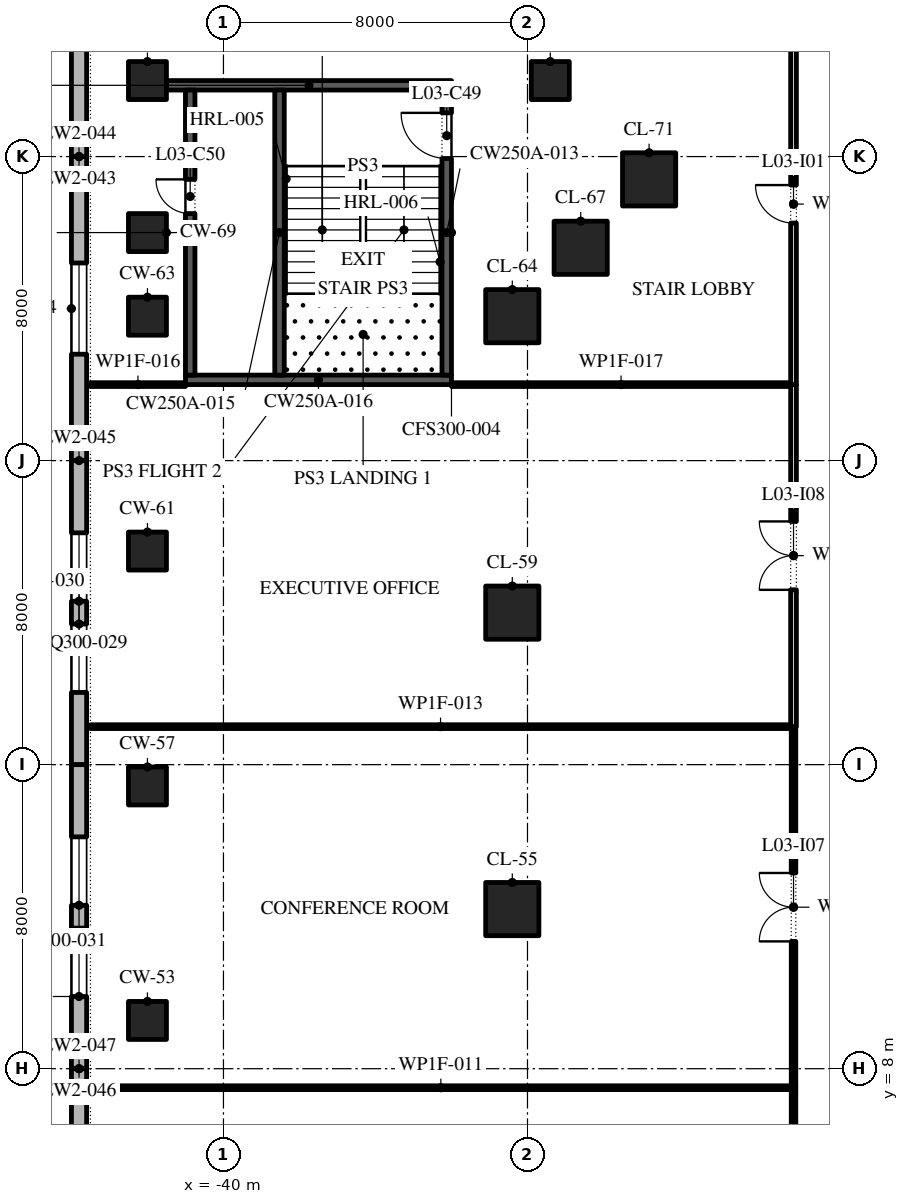
"""IFC4 building model, lengths in metres.
Left out: names, types, materials, properties, quantities, classifications, styles, units other than length and angle.
Written with IfcOpenShell. Run it as: python <this file> out.ifc"""

import sys

from ifc_helpers import new_model, si_unit, direction, frame, frame_2d, origin, origin_2d, place, context, subcontext, project, spatial, polyline, rectangle, outline, extrude, element, fill, save


model = new_model("IFC4")
c1 = context("Model", 3, precision=1e-05, world=origin(), true_north=direction((0.0, 1.0)))
c2 = subcontext(c1, "Body", "Model", "MODEL_VIEW")
j1 = project(units=[si_unit("LENGTHUNIT", "METRE"), si_unit("PLANEANGLEUNIT", "RADIAN")], contexts=[c1])
p1 = place(None, origin())
s1 = spatial("IfcSite", under=j1, at=p1, CompositionType="ELEMENT")
p2 = place(p1, origin())
s2 = spatial("IfcBuilding", under=s1, at=p2, CompositionType="ELEMENT")
p3 = place(p2, frame((0.0, 0.0, 19.2)))
s3 = spatial("IfcBuildingStorey", under=s2, at=p3, CompositionType="ELEMENT", Elevation=19.2)
p4 = place(p3, frame((-42.0, 9.27, 0.0), z_axis=(0.0, 0.0, 1.0), x_axis=(1.0, 0.0, 0.0)))
e1 = element("IfcColumn", 1, at=p4, inside=s3, PredefinedType="COLUMN", context=c2, shape_type="SweptSolid", body=[
    extrude(rectangle(XDim=1.0, YDim=1.0, at=origin_2d()), origin(), (0.0, 0.0, 1.0), 4.8),
])
p5 = place(p3, frame((-32.4, 12.2, 0.0), z_axis=(0.0, 0.0, 1.0), x_axis=(1.0, 0.0, 0.0)))
e2 = element("IfcColumn", 2, at=p5, inside=s3, PredefinedType="COLUMN", context=c2, shape_type="SweptSolid", body=[
    extrude(rectangle(XDim=1.4, YDim=1.4, at=origin_2d()), origin(), (0.0, 0.0, 1.0), 4.8),
])
p6 = place(p3, frame((-42.0, 15.44, 0.0), z_axis=(0.0, 0.0, 1.0), x_axis=(1.0, 0.0, 0.0)))
e3 = element("IfcColumn", 3, at=p6, inside=s3, PredefinedType="COLUMN", context=c2, shape_type="SweptSolid", body=[
    extrude(rectangle(XDim=1.0, YDim=1.0, at=origin_2d()), origin(), (0.0, 0.0, 1.0), 4.8),
])
p7 = place(p3, frame((-32.4, 20.0, 0.0), z_axis=(0.0, 0.0, 1.0), x_axis=(1.0, 0.0, 0.0)))
e4 = element("IfcColumn", 4, at=p7, inside=s3, PredefinedType="COLUMN", context=c2, shape_type="SweptSolid", body=[
    extrude(rectangle(XDim=1.4, YDim=1.4, at=origin_2d()), origin(), (0.0, 0.0, 1.0), 4.8),
])
for number, where, z_axis, x_axis in (
    (5, (-42.0, 21.62, 0.0), (0.0, 0.0, 1.0), (1.0, 0.0, 0.0)),
    (6, (-42.0, 27.8, 0.0), (0.0, 0.0, 1.0), (1.0, 0.0, 0.0)),
):
    element("IfcColumn", number, at=place(p3, frame(where, z_axis=z_axis, x_axis=x_axis)), inside=s3, PredefinedType="COLUMN", context=c2, shape_type="SweptSolid", body=[
        extrude(rectangle(XDim=1.0, YDim=1.0, at=origin_2d()), origin(), (0.0, 0.0, 1.0), 4.8),
    ])
for number, where, z_axis, x_axis in (
    (7, (-32.4, 27.8, 0.0), (0.0, 0.0, 1.0), (1.0, 0.0, 0.0)),
    (8, (-30.6, 29.6, 0.0), (0.0, 0.0, 1.0), (1.0, 0.0, 0.0)),
):
    element("IfcColumn", number, at=place(p3, frame(where, z_axis=z_axis, x_axis=x_axis)), inside=s3, PredefinedType="COLUMN", context=c2, shape_type="SweptSolid", body=[
        extrude(rectangle(XDim=1.4, YDim=1.4, at=origin_2d()), origin(), (0.0, 0.0, 1.0), 4.8),
    ])
p8 = place(p3, frame((-42.0, 30.0, 0.0), z_axis=(0.0, 0.0, 1.0), x_axis=(1.0, 0.0, 0.0)))
e9 = element("IfcColumn", 9, at=p8, inside=s3, PredefinedType="COLUMN", context=c2, shape_type="SweptSolid", body=[
    extrude(rectangle(XDim=1.0, YDim=1.0, at=origin_2d()), origin(), (0.0, 0.0, 1.0), 4.8),
])
p9 = place(p3, frame((-28.8, 31.4, 0.0), z_axis=(0.0, 0.0, 1.0), x_axis=(1.0, 0.0, 0.0)))
e10 = element("IfcColumn", 10, at=p9, inside=s3, PredefinedType="COLUMN", context=c2, shape_type="SweptSolid", body=[
    extrude(rectangle(XDim=1.4, YDim=1.4, at=origin_2d()), origin(), (0.0, 0.0, 1.0), 4.8),
])
for number, where, z_axis, x_axis in (
    (11, (-42.0, 34.0, 0.0), (0.0, 0.0, 1.0), (1.0, 0.0, 0.0)),
    (12, (-31.4, 34.0, 0.0), (0.0, 0.0, 1.0), (1.0, 0.0, 0.0)),
):
    element("IfcColumn", number, at=place(p3, frame(where, z_axis=z_axis, x_axis=x_axis)), inside=s3, PredefinedType="COLUMN", context=c2, shape_type="SweptSolid", body=[
        extrude(rectangle(XDim=1.0, YDim=1.0, at=origin_2d()), origin(), (0.0, 0.0, 1.0), 4.8),
    ])
p10 = place(p3, frame((-43.8, 35.6, 0.0), z_axis=(0.0, 0.0, 1.0), x_axis=(0.0, -1.0, 0.0)))
e13 = element("IfcWall", 13, at=p10, inside=s3, PredefinedType="STANDARD", context=c2, shape_type="SweptSolid", body=[
    extrude(rectangle(XDim=3.6, YDim=0.4, at=frame_2d((1.8, 0.0))), origin(), (0.0, 0.0, 1.0), 4.5),
])
p11 = place(p3, frame((-43.8, 32.0, 0.0), z_axis=(0.0, 0.0, 1.0), x_axis=(0.0, -1.0, 0.0)))
e14 = element("IfcWall", 14, at=p11, inside=s3, PredefinedType="STANDARD", context=c2, shape_type="SweptSolid", body=[
    extrude(rectangle(XDim=8.0, YDim=0.4, at=frame_2d((4.0, 0.0))), origin(), (0.0, 0.0, 1.0), 4.5),
])
p12 = place(p11, frame((2.8, 0.0, 0.9)))
e15 = element("IfcOpeningElement", 15, at=p12, cuts=e14, PredefinedType="OPENING", context=c2, shape_type="SweptSolid", body=[
    extrude(outline(polyline([(0.0, 0.0), (2.4, 0.0), (2.4, 1.5), (2.378, 1.758), (2.313, 2.009), (2.207, 2.245), (2.063, 2.46), (1.885, 2.648), (1.677, 2.804), (1.447, 2.922), (1.2, 3.0), (0.953, 2.922), (0.722, 2.804), (0.515, 2.648), (0.337, 2.46), (0.193, 2.245), (0.087, 2.009), (0.022, 1.758), (0.0, 1.5), (0.0, 0.0)])), frame((0.0, 0.21, 0.0), z_axis=(0.0, -1.0, 0.0), x_axis=(1.0, 0.0, 0.0)), (0.0, 0.0, 1.0), 0.42),
])
p13 = place(p3, frame((-43.8, 24.0, 0.0), z_axis=(0.0, 0.0, 1.0), x_axis=(0.0, -1.0, 0.0)))
e16 = element("IfcWall", 16, at=p13, inside=s3, PredefinedType="STANDARD", context=c2, shape_type="SweptSolid", body=[
    extrude(rectangle(XDim=8.0, YDim=0.4, at=frame_2d((4.0, 0.0))), origin(), (0.0, 0.0, 1.0), 4.5),
])
p14 = place(p13, frame((1.9, 0.0, 0.9)))
e17 = element("IfcOpeningElement", 17, at=p14, cuts=e16, PredefinedType="OPENING", context=c2, shape_type="SweptSolid", body=[
    extrude(outline(polyline([(0.0, 0.0), (1.8, 0.0), (1.8, 1.5), (1.785, 1.729), (1.738, 1.954), (1.662, 2.17), (1.558, 2.375), (1.427, 2.563), (1.271, 2.732), (1.095, 2.879), (0.9, 3.0), (0.705, 2.879), (0.529, 2.732), (0.373, 2.563), (0.242, 2.375), (0.138, 2.17), (0.062, 1.954), (0.015, 1.729), (0.0, 1.5), (0.0, 0.0)])), frame((0.0, 0.21, 0.0), z_axis=(0.0, -1.0, 0.0), x_axis=(1.0, 0.0, 0.0)), (0.0, 0.0, 1.0), 0.42),
])
p15 = place(p13, frame((4.3, 0.0, 0.9)))
e18 = element("IfcOpeningElement", 18, at=p15, cuts=e16, PredefinedType="OPENING", context=c2, shape_type="SweptSolid", body=[
    extrude(outline(polyline([(0.0, 0.0), (1.8, 0.0), (1.8, 1.5), (1.785, 1.729), (1.738, 1.954), (1.662, 2.17), (1.558, 2.375), (1.427, 2.563), (1.271, 2.732), (1.095, 2.879), (0.9, 3.0), (0.705, 2.879), (0.529, 2.732), (0.373, 2.563), (0.242, 2.375), (0.138, 2.17), (0.062, 1.954), (0.015, 1.729), (0.0, 1.5), (0.0, 0.0)])), frame((0.0, 0.21, 0.0), z_axis=(0.0, -1.0, 0.0), x_axis=(1.0, 0.0, 0.0)), (0.0, 0.0, 1.0), 0.42),
])
p16 = place(p3, frame((-43.8, 16.0, 0.0), z_axis=(0.0, 0.0, 1.0), x_axis=(0.0, -1.0, 0.0)))
e19 = element("IfcWall", 19, at=p16, inside=s3, PredefinedType="STANDARD", context=c2, shape_type="SweptSolid", body=[
    extrude(rectangle(XDim=8.0, YDim=0.4, at=frame_2d((4.0, 0.0))), origin(), (0.0, 0.0, 1.0), 4.5),
])
p17 = place(p16, frame((1.9, 0.0, 0.9)))
e20 = element("IfcOpeningElement", 20, at=p17, cuts=e19, PredefinedType="OPENING", context=c2, shape_type="SweptSolid", body=[
    extrude(outline(polyline([(0.0, 0.0), (1.8, 0.0), (1.8, 1.5), (1.785, 1.729), (1.738, 1.954), (1.662, 2.17), (1.558, 2.375), (1.427, 2.563), (1.271, 2.732), (1.095, 2.879), (0.9, 3.0), (0.705, 2.879), (0.529, 2.732), (0.373, 2.563), (0.242, 2.375), (0.138, 2.17), (0.062, 1.954), (0.015, 1.729), (0.0, 1.5), (0.0, 0.0)])), frame((0.0, 0.21, 0.0), z_axis=(0.0, -1.0, 0.0), x_axis=(1.0, 0.0, 0.0)), (0.0, 0.0, 1.0), 0.42),
])
p18 = place(p16, frame((4.3, 0.0, 0.9)))
e21 = element("IfcOpeningElement", 21, at=p18, cuts=e19, PredefinedType="OPENING", context=c2, shape_type="SweptSolid", body=[
    extrude(outline(polyline([(0.0, 0.0), (1.8, 0.0), (1.8, 1.5), (1.785, 1.729), (1.738, 1.954), (1.662, 2.17), (1.558, 2.375), (1.427, 2.563), (1.271, 2.732), (1.095, 2.879), (0.9, 3.0), (0.705, 2.879), (0.529, 2.732), (0.373, 2.563), (0.242, 2.375), (0.138, 2.17), (0.062, 1.954), (0.015, 1.729), (0.0, 1.5), (0.0, 0.0)])), frame((0.0, 0.21, 0.0), z_axis=(0.0, -1.0, 0.0), x_axis=(1.0, 0.0, 0.0)), (0.0, 0.0, 1.0), 0.42),
])
p19 = place(p3, frame((-43.8, 8.0, 0.0), z_axis=(0.0, 0.0, 1.0), x_axis=(0.0, -1.0, 0.0)))
e22 = element("IfcWall", 22, at=p19, inside=s3, PredefinedType="STANDARD", context=c2, shape_type="SweptSolid", body=[
    extrude(rectangle(XDim=8.0, YDim=0.4, at=frame_2d((4.0, 0.0))), origin(), (0.0, 0.0, 1.0), 4.5),
])
p20 = place(p19, frame((1.9, 0.0, 0.9)))
e23 = element("IfcOpeningElement", 23, at=p20, cuts=e22, PredefinedType="OPENING", context=c2, shape_type="SweptSolid", body=[
    extrude(outline(polyline([(0.0, 0.0), (1.8, 0.0), (1.8, 1.5), (1.785, 1.729), (1.738, 1.954), (1.662, 2.17), (1.558, 2.375), (1.427, 2.563), (1.271, 2.732), (1.095, 2.879), (0.9, 3.0), (0.705, 2.879), (0.529, 2.732), (0.373, 2.563), (0.242, 2.375), (0.138, 2.17), (0.062, 1.954), (0.015, 1.729), (0.0, 1.5), (0.0, 0.0)])), frame((0.0, 0.21, 0.0), z_axis=(0.0, -1.0, 0.0), x_axis=(1.0, 0.0, 0.0)), (0.0, 0.0, 1.0), 0.42),
])
p21 = place(p19, frame((4.3, 0.0, 0.9)))
e24 = element("IfcOpeningElement", 24, at=p21, cuts=e22, PredefinedType="OPENING", context=c2, shape_type="SweptSolid", body=[
    extrude(outline(polyline([(0.0, 0.0), (1.8, 0.0), (1.8, 1.5), (1.785, 1.729), (1.738, 1.954), (1.662, 2.17), (1.558, 2.375), (1.427, 2.563), (1.271, 2.732), (1.095, 2.879), (0.9, 3.0), (0.705, 2.879), (0.529, 2.732), (0.373, 2.563), (0.242, 2.375), (0.138, 2.17), (0.062, 1.954), (0.015, 1.729), (0.0, 1.5), (0.0, 0.0)])), frame((0.0, 0.21, 0.0), z_axis=(0.0, -1.0, 0.0), x_axis=(1.0, 0.0, 0.0)), (0.0, 0.0, 1.0), 0.42),
])
p22 = place(p3, frame((-41.0, 26.125, 0.0), z_axis=(0.0, 0.0, 1.0), x_axis=(1.0, 0.0, 0.0)))
e25 = element("IfcWall", 25, at=p22, inside=s3, PredefinedType="SHEAR", context=c2, shape_type="SweptSolid", body=[
    extrude(rectangle(XDim=7.0, YDim=0.25, at=frame_2d((3.5, 0.0))), origin(), (0.0, 0.0, 1.0), 4.5),
])
p23 = place(p3, frame((-41.5, 33.875, 0.0), z_axis=(0.0, 0.0, 1.0), x_axis=(1.0, 0.0, 0.0)))
e26 = element("IfcWall", 26, at=p23, inside=s3, PredefinedType="SHEAR", context=c2, shape_type="SweptSolid", body=[
    extrude(rectangle(XDim=7.5, YDim=0.25, at=frame_2d((3.75, 0.0))), origin(), (0.0, 0.0, 1.0), 4.5),
])
p24 = place(p3, frame((-40.875, 26.25, 0.0), z_axis=(0.0, 0.0, 1.0), x_axis=(0.0, 1.0, 0.0)))
e27 = element("IfcWall", 27, at=p24, inside=s3, PredefinedType="SHEAR", context=c2, shape_type="SweptSolid", body=[
    extrude(rectangle(XDim=7.5, YDim=0.25, at=frame_2d((3.75, 0.0))), origin(), (0.0, 0.0, 1.0), 4.5),
])
p25 = place(p24, frame((4.25, 0.0, 0.0)))
e28 = element("IfcOpeningElement", 28, at=p25, cuts=e27, PredefinedType="OPENING", context=c2, shape_type="SweptSolid", body=[
    extrude(rectangle(XDim=0.9, YDim=2.1, at=frame_2d((0.45, 1.05))), frame((0.0, 0.135, 0.0), z_axis=(0.0, -1.0, 0.0), x_axis=(1.0, 0.0, 0.0)), (0.0, 0.0, 1.0), 0.27),
])
p26 = place(p3, frame((-34.125, 26.25, 0.0), z_axis=(0.0, 0.0, 1.0), x_axis=(0.0, 1.0, 0.0)))
e29 = element("IfcWall", 29, at=p26, inside=s3, PredefinedType="SHEAR", context=c2, shape_type="SweptSolid", body=[
    extrude(rectangle(XDim=7.5, YDim=0.25, at=frame_2d((3.75, 0.0))), origin(), (0.0, 0.0, 1.0), 4.5),
])
p27 = place(p26, frame((5.7, 0.0, 0.0)))
e30 = element("IfcOpeningElement", 30, at=p27, cuts=e29, PredefinedType="OPENING", context=c2, shape_type="SweptSolid", body=[
    extrude(rectangle(XDim=1.2, YDim=2.1, at=frame_2d((0.6, 1.05))), frame((0.0, 0.135, 0.0), z_axis=(0.0, -1.0, 0.0), x_axis=(1.0, 0.0, 0.0)), (0.0, 0.0, 1.0), 0.27),
])
p28 = place(p3, frame((-38.525, 26.25, 0.0), z_axis=(0.0, 0.0, 1.0), x_axis=(0.0, 1.0, 0.0)))
e31 = element("IfcWall", 31, at=p28, inside=s3, PredefinedType="SHEAR", context=c2, shape_type="SweptSolid", body=[
    extrude(rectangle(XDim=7.5, YDim=0.25, at=frame_2d((3.75, 0.0))), origin(), (0.0, 0.0, 1.0), 4.5),
])
p29 = place(p3, frame((-43.5, 7.5, 0.0), z_axis=(0.0, 0.0, 1.0), x_axis=(1.0, 0.0, 0.0)))
e32 = element("IfcWall", 32, at=p29, inside=s3, PredefinedType="PARTITIONING", context=c2, shape_type="SweptSolid", body=[
    extrude(rectangle(XDim=18.44, YDim=0.1, at=frame_2d((9.22, 0.0))), origin(), (0.0, 0.0, 1.0), 4.5),
])
p30 = place(p3, frame((-43.5, 17.0, 0.0), z_axis=(0.0, 0.0, 1.0), x_axis=(1.0, 0.0, 0.0)))
e33 = element("IfcWall", 33, at=p30, inside=s3, PredefinedType="PARTITIONING", context=c2, shape_type="SweptSolid", body=[
    extrude(rectangle(XDim=18.425, YDim=0.1, at=frame_2d((9.212, 0.0))), origin(), (0.0, 0.0, 1.0), 4.5),
])
p31 = place(p3, frame((-43.5, 26.0, 0.0), z_axis=(0.0, 0.0, 1.0), x_axis=(1.0, 0.0, 0.0)))
e34 = element("IfcWall", 34, at=p31, inside=s3, PredefinedType="PARTITIONING", context=c2, shape_type="SweptSolid", body=[
    extrude(rectangle(XDim=2.5, YDim=0.1, at=frame_2d((1.25, 0.0))), origin(), (0.0, 0.0, 1.0), 4.5),
])
p32 = place(p3, frame((-34.0, 26.0, 0.0), z_axis=(0.0, 0.0, 1.0), x_axis=(1.0, 0.0, 0.0)))
e35 = element("IfcWall", 35, at=p32, inside=s3, PredefinedType="PARTITIONING", context=c2, shape_type="SweptSolid", body=[
    extrude(rectangle(XDim=8.925, YDim=0.1, at=frame_2d((4.462, 0.0))), origin(), (0.0, 0.0, 1.0), 4.5),
])
p33 = place(p3, frame((-25.0, -2.0, 0.0), z_axis=(0.0, 0.0, 1.0), x_axis=(0.0, 1.0, 0.0)))
e36 = element("IfcWall", 36, at=p33, inside=s3, PredefinedType="PARTITIONING", context=c2, shape_type="SweptSolid", body=[
    extrude(rectangle(XDim=9.5, YDim=0.12, at=frame_2d((4.75, 0.0))), origin(), (0.0, 0.0, 1.0), 4.5),
])
p34 = place(p33, frame((3.85, 0.0, 0.0)))
e37 = element("IfcOpeningElement", 37, at=p34, cuts=e36, PredefinedType="OPENING", context=c2, shape_type="SweptSolid", body=[
    extrude(rectangle(XDim=1.8, YDim=2.1, at=frame_2d((0.9, 1.05))), frame((0.0, 0.07, 0.0), z_axis=(0.0, -1.0, 0.0), x_axis=(1.0, 0.0, 0.0)), (0.0, 0.0, 1.0), 0.14),
])
p35 = place(p3, frame((-25.0, 7.5, 0.0), z_axis=(0.0, 0.0, 1.0), x_axis=(0.0, 1.0, 0.0)))
e38 = element("IfcWall", 38, at=p35, inside=s3, PredefinedType="PARTITIONING", context=c2, shape_type="SweptSolid", body=[
    extrude(rectangle(XDim=9.5, YDim=0.12, at=frame_2d((4.75, 0.0))), origin(), (0.0, 0.0, 1.0), 4.5),
])
p36 = place(p35, frame((3.85, 0.0, 0.0)))
e39 = element("IfcOpeningElement", 39, at=p36, cuts=e38, PredefinedType="OPENING", context=c2, shape_type="SweptSolid", body=[
    extrude(rectangle(XDim=1.8, YDim=2.1, at=frame_2d((0.9, 1.05))), frame((0.0, 0.07, 0.0), z_axis=(0.0, -1.0, 0.0), x_axis=(1.0, 0.0, 0.0)), (0.0, 0.0, 1.0), 0.14),
])
p37 = place(p3, frame((-25.0, 17.0, 0.0), z_axis=(0.0, 0.0, 1.0), x_axis=(0.0, 1.0, 0.0)))
e40 = element("IfcWall", 40, at=p37, inside=s3, PredefinedType="PARTITIONING", context=c2, shape_type="SweptSolid", body=[
    extrude(rectangle(XDim=9.0, YDim=0.15, at=frame_2d((4.5, 0.0))), origin(), (0.0, 0.0, 1.0), 4.5),
])
p38 = place(p37, frame((3.6, 0.0, 0.0)))
e41 = element("IfcOpeningElement", 41, at=p38, cuts=e40, PredefinedType="OPENING", context=c2, shape_type="SweptSolid", body=[
    extrude(rectangle(XDim=1.8, YDim=2.1, at=frame_2d((0.9, 1.05))), frame((0.0, 0.085, 0.0), z_axis=(0.0, -1.0, 0.0), x_axis=(1.0, 0.0, 0.0)), (0.0, 0.0, 1.0), 0.17),
])
p39 = place(p3, frame((-25.0, 26.0, 0.0), z_axis=(0.0, 0.0, 1.0), x_axis=(0.0, 1.0, 0.0)))
e42 = element("IfcWall", 42, at=p39, inside=s3, PredefinedType="PARTITIONING", context=c2, shape_type="SweptSolid", body=[
    extrude(rectangle(XDim=9.5, YDim=0.15, at=frame_2d((4.75, 0.0))), origin(), (0.0, 0.0, 1.0), 4.5),
])
p40 = place(p39, frame((4.25, 0.0, 0.0)))
e43 = element("IfcOpeningElement", 43, at=p40, cuts=e42, PredefinedType="OPENING", context=c2, shape_type="SweptSolid", body=[
    extrude(rectangle(XDim=1.0, YDim=2.1, at=frame_2d((0.5, 1.05))), frame((0.0, 0.085, 0.0), z_axis=(0.0, -1.0, 0.0), x_axis=(1.0, 0.0, 0.0)), (0.0, 0.0, 1.0), 0.17),
])
p41 = place(p12, origin())
e44 = element("IfcWindow", 44, at=p41, inside=s3, PartitioningType="DOUBLE_PANEL_VERTICAL", PredefinedType="WINDOW", context=c2, shape_type="SweptSolid", body=[
    extrude(outline(polyline([(0.0, 0.0), (2.4, 0.0), (2.4, 1.5), (2.378, 1.758), (2.313, 2.009), (2.207, 2.245), (2.063, 2.46), (1.885, 2.648), (1.677, 2.804), (1.447, 2.922), (1.2, 3.0), (0.953, 2.922), (0.722, 2.804), (0.515, 2.648), (0.337, 2.46), (0.193, 2.245), (0.087, 2.009), (0.022, 1.758), (0.0, 1.5), (0.0, 0.0)])), frame((0.0, 0.03, 0.0), z_axis=(0.0, -1.0, 0.0), x_axis=(1.0, 0.0, 0.0)), (0.0, 0.0, 1.0), 0.06),
])
fill(e15, e44)
p42 = place(p14, origin())
e45 = element("IfcWindow", 45, at=p42, inside=s3, PartitioningType="DOUBLE_PANEL_VERTICAL", PredefinedType="WINDOW", context=c2, shape_type="SweptSolid", body=[
    extrude(outline(polyline([(0.0, 0.0), (1.8, 0.0), (1.8, 1.5), (1.785, 1.729), (1.738, 1.954), (1.662, 2.17), (1.558, 2.375), (1.427, 2.563), (1.271, 2.732), (1.095, 2.879), (0.9, 3.0), (0.705, 2.879), (0.529, 2.732), (0.373, 2.563), (0.242, 2.375), (0.138, 2.17), (0.062, 1.954), (0.015, 1.729), (0.0, 1.5), (0.0, 0.0)])), frame((0.0, 0.03, 0.0), z_axis=(0.0, -1.0, 0.0), x_axis=(1.0, 0.0, 0.0)), (0.0, 0.0, 1.0), 0.06),
])
fill(e17, e45)
p43 = place(p15, origin())
e46 = element("IfcWindow", 46, at=p43, inside=s3, PartitioningType="DOUBLE_PANEL_VERTICAL", PredefinedType="WINDOW", context=c2, shape_type="SweptSolid", body=[
    extrude(outline(polyline([(0.0, 0.0), (1.8, 0.0), (1.8, 1.5), (1.785, 1.729), (1.738, 1.954), (1.662, 2.17), (1.558, 2.375), (1.427, 2.563), (1.271, 2.732), (1.095, 2.879), (0.9, 3.0), (0.705, 2.879), (0.529, 2.732), (0.373, 2.563), (0.242, 2.375), (0.138, 2.17), (0.062, 1.954), (0.015, 1.729), (0.0, 1.5), (0.0, 0.0)])), frame((0.0, 0.03, 0.0), z_axis=(0.0, -1.0, 0.0), x_axis=(1.0, 0.0, 0.0)), (0.0, 0.0, 1.0), 0.06),
])
fill(e18, e46)
p44 = place(p17, origin())
e47 = element("IfcWindow", 47, at=p44, inside=s3, PartitioningType="DOUBLE_PANEL_VERTICAL", PredefinedType="WINDOW", context=c2, shape_type="SweptSolid", body=[
    extrude(outline(polyline([(0.0, 0.0), (1.8, 0.0), (1.8, 1.5), (1.785, 1.729), (1.738, 1.954), (1.662, 2.17), (1.558, 2.375), (1.427, 2.563), (1.271, 2.732), (1.095, 2.879), (0.9, 3.0), (0.705, 2.879), (0.529, 2.732), (0.373, 2.563), (0.242, 2.375), (0.138, 2.17), (0.062, 1.954), (0.015, 1.729), (0.0, 1.5), (0.0, 0.0)])), frame((0.0, 0.03, 0.0), z_axis=(0.0, -1.0, 0.0), x_axis=(1.0, 0.0, 0.0)), (0.0, 0.0, 1.0), 0.06),
])
fill(e20, e47)
p45 = place(p18, origin())
e48 = element("IfcWindow", 48, at=p45, inside=s3, PartitioningType="DOUBLE_PANEL_VERTICAL", PredefinedType="WINDOW", context=c2, shape_type="SweptSolid", body=[
    extrude(outline(polyline([(0.0, 0.0), (1.8, 0.0), (1.8, 1.5), (1.785, 1.729), (1.738, 1.954), (1.662, 2.17), (1.558, 2.375), (1.427, 2.563), (1.271, 2.732), (1.095, 2.879), (0.9, 3.0), (0.705, 2.879), (0.529, 2.732), (0.373, 2.563), (0.242, 2.375), (0.138, 2.17), (0.062, 1.954), (0.015, 1.729), (0.0, 1.5), (0.0, 0.0)])), frame((0.0, 0.03, 0.0), z_axis=(0.0, -1.0, 0.0), x_axis=(1.0, 0.0, 0.0)), (0.0, 0.0, 1.0), 0.06),
])
fill(e21, e48)
p46 = place(p27, origin())
e49 = element("IfcDoor", 49, at=p46, inside=s3, OperationType="SINGLE_SWING_LEFT", PredefinedType="DOOR", context=c2, shape_type="SweptSolid", body=[
    extrude(rectangle(XDim=1.2, YDim=2.1, at=frame_2d((0.6, 1.05))), frame((0.0, 0.025, 0.0), z_axis=(0.0, -1.0, 0.0), x_axis=(1.0, 0.0, 0.0)), (0.0, 0.0, 1.0), 0.05),
])
fill(e30, e49)
p47 = place(p25, origin())
e50 = element("IfcDoor", 50, at=p47, inside=s3, OperationType="SINGLE_SWING_LEFT", PredefinedType="DOOR", context=c2, shape_type="SweptSolid", body=[
    extrude(rectangle(XDim=0.9, YDim=2.1, at=frame_2d((0.45, 1.05))), frame((0.0, -0.075, 0.0), z_axis=(0.0, -1.0, 0.0), x_axis=(1.0, 0.0, 0.0)), (0.0, 0.0, 1.0), 0.05),
])
fill(e28, e50)
p48 = place(p40, origin())
e51 = element("IfcDoor", 51, at=p48, inside=s3, OperationType="SINGLE_SWING_LEFT", PredefinedType="DOOR", context=c2, shape_type="SweptSolid", body=[
    extrude(rectangle(XDim=1.0, YDim=2.1, at=frame_2d((0.5, 1.05))), frame((0.0, 0.025, 0.0), z_axis=(0.0, -1.0, 0.0), x_axis=(1.0, 0.0, 0.0)), (0.0, 0.0, 1.0), 0.05),
])
fill(e43, e51)
p49 = place(p36, origin())
e52 = element("IfcDoor", 52, at=p49, inside=s3, OperationType="SINGLE_SWING_RIGHT", PredefinedType="DOOR", context=c2, shape_type="SweptSolid", body=[
    extrude(rectangle(XDim=1.8, YDim=2.1, at=frame_2d((0.9, 1.05))), frame((0.0, 0.025, 0.0), z_axis=(0.0, -1.0, 0.0), x_axis=(1.0, 0.0, 0.0)), (0.0, 0.0, 1.0), 0.05),
])
fill(e39, e52)
p50 = place(p38, origin())
e53 = element("IfcDoor", 53, at=p50, inside=s3, OperationType="SINGLE_SWING_LEFT", PredefinedType="DOOR", context=c2, shape_type="SweptSolid", body=[
    extrude(rectangle(XDim=1.8, YDim=2.1, at=frame_2d((0.9, 1.05))), frame((0.0, 0.025, 0.0), z_axis=(0.0, -1.0, 0.0), x_axis=(1.0, 0.0, 0.0)), (0.0, 0.0, 1.0), 0.05),
])
fill(e41, e53)
save(model, sys.argv[1])
